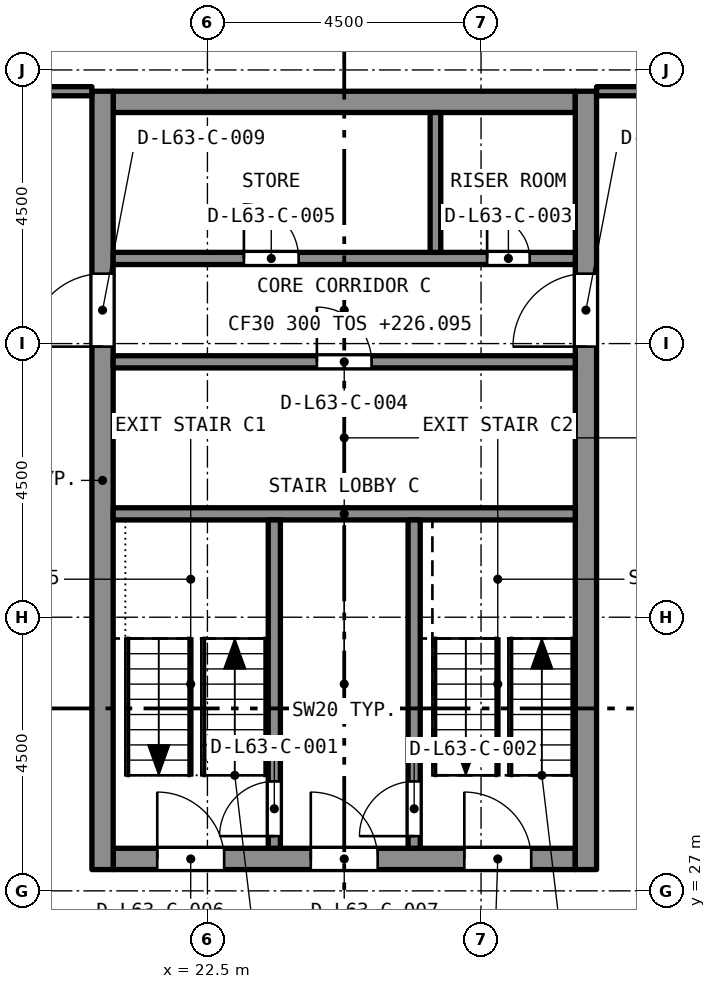
"""IFC4 building model, lengths in metres.
Left out: names, types, materials, properties, quantities, classifications, styles, units other than length and angle.
Written with IfcOpenShell. Run it as: python <this file> out.ifc"""

import sys

from ifc_helpers import new_model, si_unit, direction, frame, frame_2d, origin, place, context, subcontext, project, spatial, rectangle, extrude, element, fill, save


model = new_model("IFC4")
c1 = context("Model", 3, precision=1e-05, world=origin(), true_north=direction((0.0, 1.0)))
c2 = subcontext(c1, "Body", "Model", "MODEL_VIEW")
j1 = project(units=[si_unit("LENGTHUNIT", "METRE"), si_unit("PLANEANGLEUNIT", "RADIAN")], contexts=[c1])
p1 = place(None, origin())
s1 = spatial("IfcSite", under=j1, at=p1, CompositionType="ELEMENT")
p2 = place(p1, origin())
s2 = spatial("IfcBuilding", under=s1, at=p2, CompositionType="ELEMENT")
p3 = place(p2, frame((0.0, 0.0, 226.095)))
s3 = spatial("IfcBuildingStorey", under=s2, at=p3, CompositionType="ELEMENT", Elevation=226.095)
p4 = place(p3, frame((20.95, 27.525, 0.0), z_axis=(0.0, 0.0, 1.0), x_axis=(1.0, 0.0, 0.0)))
e1 = element("IfcWall", 1, at=p4, inside=s3, PredefinedType="SOLIDWALL", context=c2, shape_type="SweptSolid", body=[
    extrude(rectangle(XDim=7.6, YDim=0.35, at=frame_2d((3.8, 0.0))), origin(), (0.0, 0.0, 1.0), 3.2),
])
p5 = place(p4, frame((0.725, 0.0, 0.0)))
e2 = element("IfcOpeningElement", 2, at=p5, cuts=e1, PredefinedType="OPENING", context=c2, shape_type="SweptSolid", body=[
    extrude(rectangle(XDim=1.1, YDim=2.1, at=frame_2d((0.55, 1.05))), frame((0.0, 0.185, 0.0), z_axis=(0.0, -1.0, 0.0), x_axis=(1.0, 0.0, 0.0)), (0.0, 0.0, 1.0), 0.37),
])
p6 = place(p4, frame((3.25, 0.0, 0.0)))
e3 = element("IfcOpeningElement", 3, at=p6, cuts=e1, PredefinedType="OPENING", context=c2, shape_type="SweptSolid", body=[
    extrude(rectangle(XDim=1.1, YDim=2.1, at=frame_2d((0.55, 1.05))), frame((0.0, 0.185, 0.0), z_axis=(0.0, -1.0, 0.0), x_axis=(1.0, 0.0, 0.0)), (0.0, 0.0, 1.0), 0.37),
])
p7 = place(p4, frame((5.775, 0.0, 0.0)))
e4 = element("IfcOpeningElement", 4, at=p7, cuts=e1, PredefinedType="OPENING", context=c2, shape_type="SweptSolid", body=[
    extrude(rectangle(XDim=1.1, YDim=2.1, at=frame_2d((0.55, 1.05))), frame((0.0, 0.185, 0.0), z_axis=(0.0, -1.0, 0.0), x_axis=(1.0, 0.0, 0.0)), (0.0, 0.0, 1.0), 0.37),
])
p8 = place(p3, frame((20.95, 39.975, 0.0), z_axis=(0.0, 0.0, 1.0), x_axis=(1.0, 0.0, 0.0)))
e5 = element("IfcWall", 5, at=p8, inside=s3, PredefinedType="SOLIDWALL", context=c2, shape_type="SweptSolid", body=[
    extrude(rectangle(XDim=7.6, YDim=0.35, at=frame_2d((3.8, 0.0))), origin(), (0.0, 0.0, 1.0), 3.2),
])
p9 = place(p3, frame((20.775, 27.35, 0.0), z_axis=(0.0, 0.0, 1.0), x_axis=(0.0, 1.0, 0.0)))
e6 = element("IfcWall", 6, at=p9, inside=s3, PredefinedType="SOLIDWALL", context=c2, shape_type="SweptSolid", body=[
    extrude(rectangle(XDim=12.8, YDim=0.35, at=frame_2d((6.4, 0.0))), origin(), (0.0, 0.0, 1.0), 3.2),
])
p10 = place(p9, frame((8.6, 0.0, 0.0)))
e7 = element("IfcOpeningElement", 7, at=p10, cuts=e6, PredefinedType="OPENING", context=c2, shape_type="SweptSolid", body=[
    extrude(rectangle(XDim=1.2, YDim=2.1, at=frame_2d((0.6, 1.05))), frame((0.0, 0.185, 0.0), z_axis=(0.0, -1.0, 0.0), x_axis=(1.0, 0.0, 0.0)), (0.0, 0.0, 1.0), 0.37),
])
p11 = place(p3, frame((28.725, 27.35, 0.0), z_axis=(0.0, 0.0, 1.0), x_axis=(0.0, 1.0, 0.0)))
e8 = element("IfcWall", 8, at=p11, inside=s3, PredefinedType="SOLIDWALL", context=c2, shape_type="SweptSolid", body=[
    extrude(rectangle(XDim=12.8, YDim=0.35, at=frame_2d((6.4, 0.0))), origin(), (0.0, 0.0, 1.0), 3.2),
])
p12 = place(p11, frame((8.6, 0.0, 0.0)))
e9 = element("IfcOpeningElement", 9, at=p12, cuts=e8, PredefinedType="OPENING", context=c2, shape_type="SweptSolid", body=[
    extrude(rectangle(XDim=1.2, YDim=2.1, at=frame_2d((0.6, 1.05))), frame((0.0, 0.185, 0.0), z_axis=(0.0, -1.0, 0.0), x_axis=(1.0, 0.0, 0.0)), (0.0, 0.0, 1.0), 0.37),
])
p13 = place(p3, frame((18.4, 40.15, 0.0), z_axis=(0.0, 0.0, 1.0), x_axis=(1.0, 0.0, 0.0)))
e10 = element("IfcWall", 10, at=p13, inside=s3, PredefinedType="PARTITIONING", context=c2, shape_type="SweptSolid", body=[
    extrude(rectangle(XDim=2.2, YDim=0.15, at=frame_2d((1.1, 0.0))), origin(), (0.0, 0.0, 1.0), 2.75),
])
p14 = place(p13, frame((0.2, 0.0, 0.0)))
e11 = element("IfcOpeningElement", 11, at=p14, cuts=e10, PredefinedType="OPENING", context=c2, shape_type="SweptSolid", body=[
    extrude(rectangle(XDim=1.0, YDim=2.1, at=frame_2d((0.5, 1.05))), frame((0.0, 0.085, 0.0), z_axis=(0.0, -1.0, 0.0), x_axis=(1.0, 0.0, 0.0)), (0.0, 0.0, 1.0), 0.17),
])
p15 = place(p3, frame((28.9, 40.15, 0.0), z_axis=(0.0, 0.0, 1.0), x_axis=(1.0, 0.0, 0.0)))
e12 = element("IfcWall", 12, at=p15, inside=s3, PredefinedType="PARTITIONING", context=c2, shape_type="SweptSolid", body=[
    extrude(rectangle(XDim=2.2, YDim=0.15, at=frame_2d((1.1, 0.0))), origin(), (0.0, 0.0, 1.0), 2.75),
])
p16 = place(p3, frame((20.95, 33.2, 0.0), z_axis=(0.0, 0.0, 1.0), x_axis=(1.0, 0.0, 0.0)))
e13 = element("IfcWall", 13, at=p16, inside=s3, PredefinedType="SOLIDWALL", context=c2, shape_type="SweptSolid", body=[
    extrude(rectangle(XDim=7.6, YDim=0.2, at=frame_2d((3.8, 0.0))), origin(), (0.0, 0.0, 1.0), 2.9),
])
p17 = place(p3, frame((20.95, 35.7, 0.0), z_axis=(0.0, 0.0, 1.0), x_axis=(1.0, 0.0, 0.0)))
e14 = element("IfcWall", 14, at=p17, inside=s3, PredefinedType="SOLIDWALL", context=c2, shape_type="SweptSolid", body=[
    extrude(rectangle(XDim=7.6, YDim=0.2, at=frame_2d((3.8, 0.0))), origin(), (0.0, 0.0, 1.0), 2.9),
])
p18 = place(p17, frame((3.35, 0.0, 0.0)))
e15 = element("IfcOpeningElement", 15, at=p18, cuts=e14, PredefinedType="OPENING", context=c2, shape_type="SweptSolid", body=[
    extrude(rectangle(XDim=0.9, YDim=2.1, at=frame_2d((0.45, 1.05))), frame((0.0, 0.11, 0.0), z_axis=(0.0, -1.0, 0.0), x_axis=(1.0, 0.0, 0.0)), (0.0, 0.0, 1.0), 0.22),
])
p19 = place(p3, frame((20.95, 37.4, 0.0), z_axis=(0.0, 0.0, 1.0), x_axis=(1.0, 0.0, 0.0)))
e16 = element("IfcWall", 16, at=p19, inside=s3, PredefinedType="SOLIDWALL", context=c2, shape_type="SweptSolid", body=[
    extrude(rectangle(XDim=7.6, YDim=0.2, at=frame_2d((3.8, 0.0))), origin(), (0.0, 0.0, 1.0), 2.9),
])
p20 = place(p19, frame((6.15, 0.0, 0.0)))
e17 = element("IfcOpeningElement", 17, at=p20, cuts=e16, PredefinedType="OPENING", context=c2, shape_type="SweptSolid", body=[
    extrude(rectangle(XDim=0.7, YDim=2.1, at=frame_2d((0.35, 1.05))), frame((0.0, 0.11, 0.0), z_axis=(0.0, -1.0, 0.0), x_axis=(1.0, 0.0, 0.0)), (0.0, 0.0, 1.0), 0.22),
])
p21 = place(p19, frame((2.15, 0.0, 0.0)))
e18 = element("IfcOpeningElement", 18, at=p21, cuts=e16, PredefinedType="OPENING", context=c2, shape_type="SweptSolid", body=[
    extrude(rectangle(XDim=0.9, YDim=2.1, at=frame_2d((0.45, 1.05))), frame((0.0, 0.11, 0.0), z_axis=(0.0, -1.0, 0.0), x_axis=(1.0, 0.0, 0.0)), (0.0, 0.0, 1.0), 0.22),
])
p22 = place(p3, frame((23.6, 27.7, 0.0), z_axis=(0.0, 0.0, 1.0), x_axis=(0.0, 1.0, 0.0)))
e19 = element("IfcWall", 19, at=p22, inside=s3, PredefinedType="SOLIDWALL", context=c2, shape_type="SweptSolid", body=[
    extrude(rectangle(XDim=5.4, YDim=0.2, at=frame_2d((2.7, 0.0))), origin(), (0.0, 0.0, 1.0), 2.9),
])
p23 = place(p22, frame((0.2, 0.0, 0.0)))
e20 = element("IfcOpeningElement", 20, at=p23, cuts=e19, PredefinedType="OPENING", context=c2, shape_type="SweptSolid", body=[
    extrude(rectangle(XDim=0.9, YDim=2.1, at=frame_2d((0.45, 1.05))), frame((0.0, 0.11, 0.0), z_axis=(0.0, -1.0, 0.0), x_axis=(1.0, 0.0, 0.0)), (0.0, 0.0, 1.0), 0.22),
])
p24 = place(p3, frame((25.9, 27.7, 0.0), z_axis=(0.0, 0.0, 1.0), x_axis=(0.0, 1.0, 0.0)))
e21 = element("IfcWall", 21, at=p24, inside=s3, PredefinedType="SOLIDWALL", context=c2, shape_type="SweptSolid", body=[
    extrude(rectangle(XDim=5.4, YDim=0.2, at=frame_2d((2.7, 0.0))), origin(), (0.0, 0.0, 1.0), 2.9),
])
p25 = place(p24, frame((0.2, 0.0, 0.0)))
e22 = element("IfcOpeningElement", 22, at=p25, cuts=e21, PredefinedType="OPENING", context=c2, shape_type="SweptSolid", body=[
    extrude(rectangle(XDim=0.9, YDim=2.1, at=frame_2d((0.45, 1.05))), frame((0.0, 0.11, 0.0), z_axis=(0.0, -1.0, 0.0), x_axis=(1.0, 0.0, 0.0)), (0.0, 0.0, 1.0), 0.22),
])
p26 = place(p3, frame((26.25, 37.5, 0.0), z_axis=(0.0, 0.0, 1.0), x_axis=(0.0, 1.0, 0.0)))
e23 = element("IfcWall", 23, at=p26, inside=s3, PredefinedType="SOLIDWALL", context=c2, shape_type="SweptSolid", body=[
    extrude(rectangle(XDim=2.3, YDim=0.175, at=frame_2d((1.15, 0.0))), origin(), (0.0, 0.0, 1.0), 2.9),
])
p27 = place(p23, origin())
e24 = element("IfcDoor", 24, at=p27, inside=s3, OperationType="SINGLE_SWING_LEFT", PredefinedType="DOOR", context=c2, shape_type="SweptSolid", body=[
    extrude(rectangle(XDim=0.9, YDim=2.1, at=frame_2d((0.45, 1.05))), frame((0.0, 0.025, 0.0), z_axis=(0.0, -1.0, 0.0), x_axis=(1.0, 0.0, 0.0)), (0.0, 0.0, 1.0), 0.05),
])
fill(e20, e24)
p28 = place(p25, origin())
e25 = element("IfcDoor", 25, at=p28, inside=s3, OperationType="SINGLE_SWING_LEFT", PredefinedType="DOOR", context=c2, shape_type="SweptSolid", body=[
    extrude(rectangle(XDim=0.9, YDim=2.1, at=frame_2d((0.45, 1.05))), frame((0.0, 0.025, 0.0), z_axis=(0.0, -1.0, 0.0), x_axis=(1.0, 0.0, 0.0)), (0.0, 0.0, 1.0), 0.05),
])
fill(e22, e25)
p29 = place(p20, origin())
e26 = element("IfcDoor", 26, at=p29, inside=s3, OperationType="SINGLE_SWING_LEFT", PredefinedType="DOOR", context=c2, shape_type="SweptSolid", body=[
    extrude(rectangle(XDim=0.7, YDim=2.1, at=frame_2d((0.35, 1.05))), frame((0.0, 0.025, 0.0), z_axis=(0.0, -1.0, 0.0), x_axis=(1.0, 0.0, 0.0)), (0.0, 0.0, 1.0), 0.05),
])
fill(e17, e26)
p30 = place(p18, origin())
e27 = element("IfcDoor", 27, at=p30, inside=s3, OperationType="SINGLE_SWING_LEFT", PredefinedType="DOOR", context=c2, shape_type="SweptSolid", body=[
    extrude(rectangle(XDim=0.9, YDim=2.1, at=frame_2d((0.45, 1.05))), frame((0.0, 0.025, 0.0), z_axis=(0.0, -1.0, 0.0), x_axis=(1.0, 0.0, 0.0)), (0.0, 0.0, 1.0), 0.05),
])
fill(e15, e27)
p31 = place(p21, origin())
e28 = element("IfcDoor", 28, at=p31, inside=s3, OperationType="SINGLE_SWING_LEFT", PredefinedType="DOOR", context=c2, shape_type="SweptSolid", body=[
    extrude(rectangle(XDim=0.9, YDim=2.1, at=frame_2d((0.45, 1.05))), frame((0.0, 0.025, 0.0), z_axis=(0.0, -1.0, 0.0), x_axis=(1.0, 0.0, 0.0)), (0.0, 0.0, 1.0), 0.05),
])
fill(e18, e28)
p32 = place(p5, origin())
e29 = element("IfcDoor", 29, at=p32, inside=s3, OperationType="SINGLE_SWING_LEFT", PredefinedType="DOOR", context=c2, shape_type="SweptSolid", body=[
    extrude(rectangle(XDim=1.1, YDim=2.1, at=frame_2d((0.55, 1.05))), frame((0.0, 0.025, 0.0), z_axis=(0.0, -1.0, 0.0), x_axis=(1.0, 0.0, 0.0)), (0.0, 0.0, 1.0), 0.05),
])
fill(e2, e29)
p33 = place(p6, origin())
e30 = element("IfcDoor", 30, at=p33, inside=s3, OperationType="SINGLE_SWING_LEFT", PredefinedType="DOOR", context=c2, shape_type="SweptSolid", body=[
    extrude(rectangle(XDim=1.1, YDim=2.1, at=frame_2d((0.55, 1.05))), frame((0.0, 0.025, 0.0), z_axis=(0.0, -1.0, 0.0), x_axis=(1.0, 0.0, 0.0)), (0.0, 0.0, 1.0), 0.05),
])
fill(e3, e30)
p34 = place(p7, origin())
e31 = element("IfcDoor", 31, at=p34, inside=s3, OperationType="SINGLE_SWING_LEFT", PredefinedType="DOOR", context=c2, shape_type="SweptSolid", body=[
    extrude(rectangle(XDim=1.1, YDim=2.1, at=frame_2d((0.55, 1.05))), frame((0.0, 0.025, 0.0), z_axis=(0.0, -1.0, 0.0), x_axis=(1.0, 0.0, 0.0)), (0.0, 0.0, 1.0), 0.05),
])
fill(e4, e31)
p35 = place(p10, origin())
e32 = element("IfcDoor", 32, at=p35, inside=s3, OperationType="SINGLE_SWING_LEFT", PredefinedType="DOOR", context=c2, shape_type="SweptSolid", body=[
    extrude(rectangle(XDim=1.2, YDim=2.1, at=frame_2d((0.6, 1.05))), frame((0.0, 0.025, 0.0), z_axis=(0.0, -1.0, 0.0), x_axis=(1.0, 0.0, 0.0)), (0.0, 0.0, 1.0), 0.05),
])
fill(e7, e32)
p36 = place(p12, origin())
e33 = element("IfcDoor", 33, at=p36, inside=s3, OperationType="SINGLE_SWING_LEFT", PredefinedType="DOOR", context=c2, shape_type="SweptSolid", body=[
    extrude(rectangle(XDim=1.2, YDim=2.1, at=frame_2d((0.6, 1.05))), frame((0.0, 0.025, 0.0), z_axis=(0.0, -1.0, 0.0), x_axis=(1.0, 0.0, 0.0)), (0.0, 0.0, 1.0), 0.05),
])
fill(e9, e33)
save(model, sys.argv[1])
